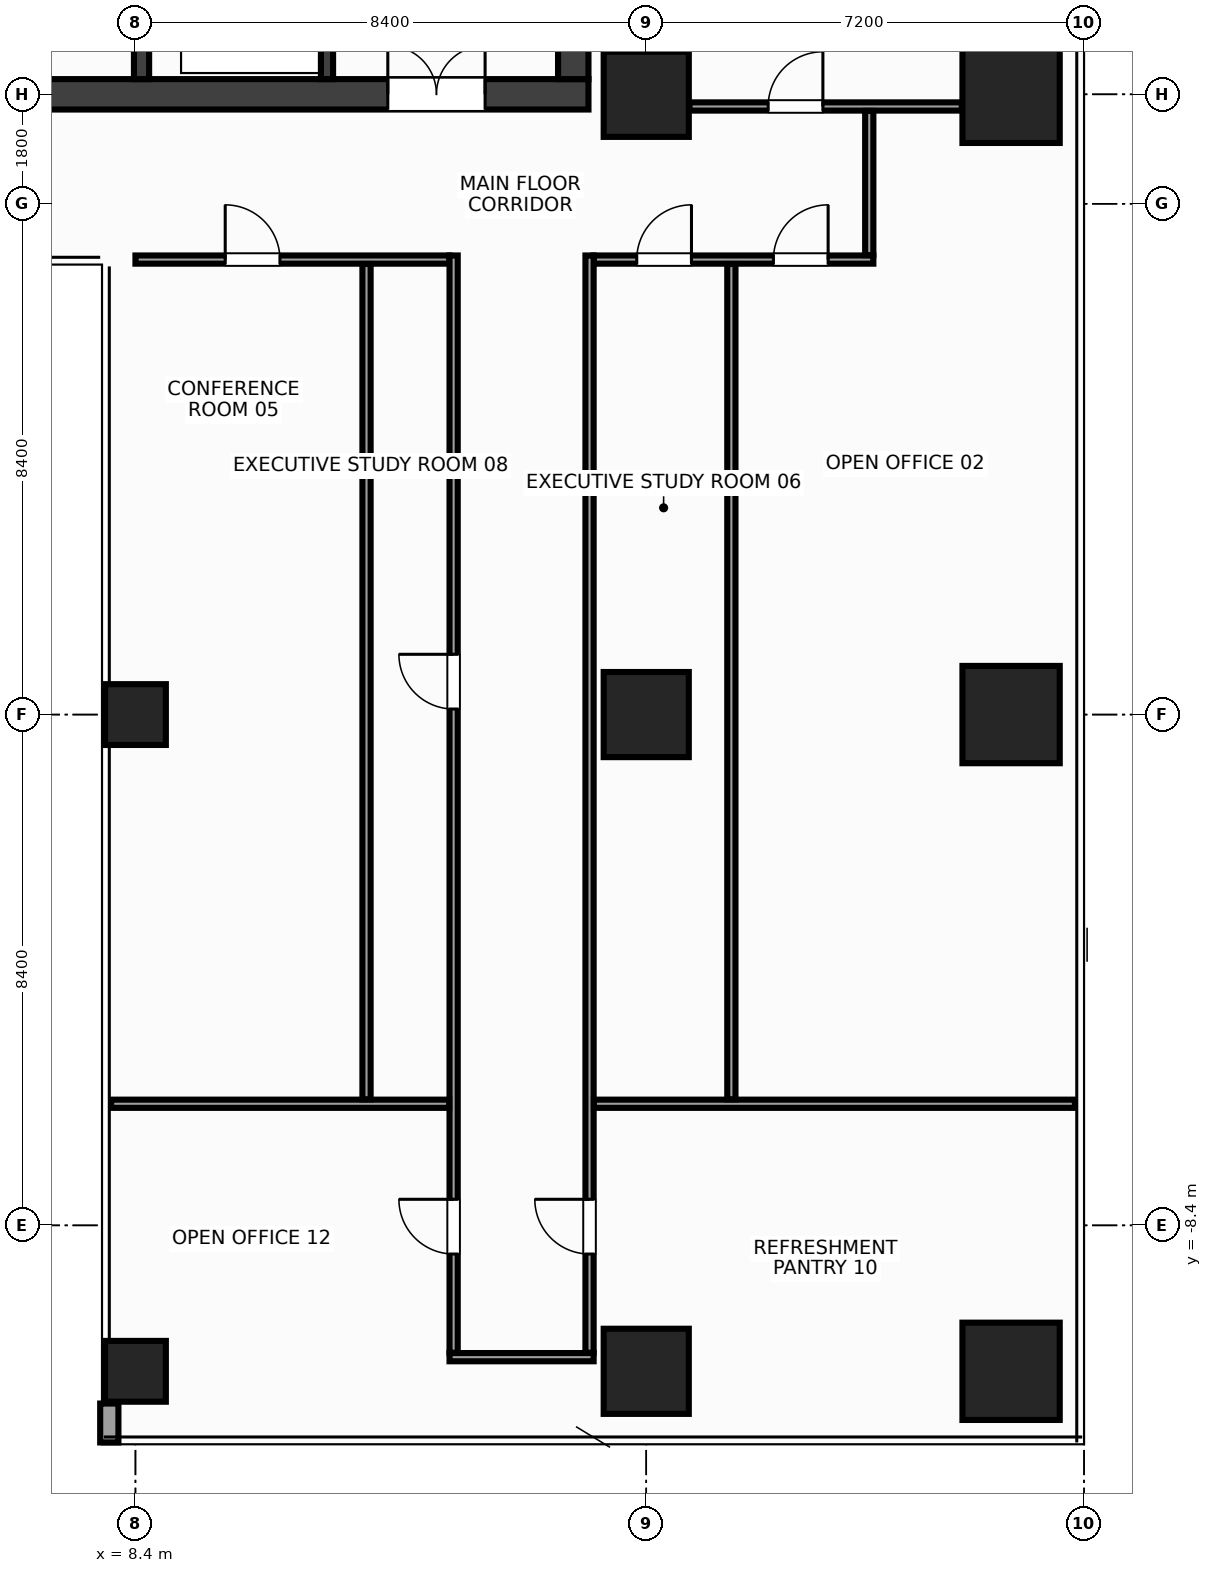
"""IFC4 building model, lengths in metres.
Left out: names, types, materials, properties, quantities, classifications, styles, units other than length and angle.
Written with IfcOpenShell. Run it as: python <this file> out.ifc"""

import sys

from ifc_helpers import new_model, si_unit, direction, frame, frame_2d, origin, origin_2d, place, context, subcontext, project, spatial, rectangle, hollow_rectangle, extrude, source, transform, mapped, element, fill, save


model = new_model("IFC4")
c1 = context("Model", 3, precision=1e-05, world=origin(), true_north=direction((0.0, 1.0)))
c2 = subcontext(c1, "Body", "Model", "MODEL_VIEW")
j1 = project(units=[si_unit("LENGTHUNIT", "METRE"), si_unit("PLANEANGLEUNIT", "RADIAN")], contexts=[c1])
p1 = place(None, origin())
s1 = spatial("IfcSite", under=j1, at=p1, CompositionType="ELEMENT")
p2 = place(p1, origin())
s2 = spatial("IfcBuilding", under=s1, at=p2, CompositionType="ELEMENT")
p3 = place(p2, frame((0.0, 0.0, 200.0)))
s3 = spatial("IfcBuildingStorey", under=s2, at=p3, CompositionType="ELEMENT", Elevation=200.0)
m1 = source(origin(), c2, "Body", "SweptSolid", [
    extrude(rectangle(XDim=31.7, YDim=0.5, at=frame_2d((15.85, 0.0))), origin(), (0.0, 0.0, 1.0), 3.6),
])
p4 = place(p3, frame((-15.85, 10.2, 0.0), z_axis=(0.0, 0.0, 1.0), x_axis=(1.0, 0.0, 0.0)))
e1 = element("IfcWall", 1, at=p4, inside=s3, PredefinedType="SHEAR", context=c2, shape_type="MappedRepresentation", body=[
    mapped(m1, transform((0.0, 0.0, 0.0), x_axis=(1.0, 0.0, 0.0), y_axis=(0.0, 1.0, 0.0), z_axis=(0.0, 0.0, 1.0), scale=1.0)),
])
p5 = place(p4, frame((1.7, 0.0, 0.0)))
e2 = element("IfcOpeningElement", 2, at=p5, cuts=e1, PredefinedType="OPENING", context=c2, shape_type="SweptSolid", body=[
    extrude(rectangle(XDim=1.6, YDim=2.15, at=frame_2d((0.8, 1.075))), frame((0.0, 0.262, 0.0), z_axis=(0.0, -1.0, 0.0), x_axis=(1.0, 0.0, 0.0)), (0.0, 0.0, 1.0), 0.524),
])
p6 = place(p4, frame((28.4, 0.0, 0.0)))
e3 = element("IfcOpeningElement", 3, at=p6, cuts=e1, PredefinedType="OPENING", context=c2, shape_type="SweptSolid", body=[
    extrude(rectangle(XDim=1.6, YDim=2.15, at=frame_2d((0.8, 1.075))), frame((0.0, 0.262, 0.0), z_axis=(0.0, -1.0, 0.0), x_axis=(1.0, 0.0, 0.0)), (0.0, 0.0, 1.0), 0.524),
])
p7 = place(p4, frame((15.1, 0.0, 0.0)))
e4 = element("IfcOpeningElement", 4, at=p7, cuts=e1, PredefinedType="OPENING", context=c2, shape_type="SweptSolid", body=[
    extrude(rectangle(XDim=1.5, YDim=2.2, at=frame_2d((0.75, 1.1))), frame((0.0, 0.262, 0.0), z_axis=(0.0, -1.0, 0.0), x_axis=(1.0, 0.0, 0.0)), (0.0, 0.0, 1.0), 0.524),
])
m2 = source(origin(), c2, "Body", "SweptSolid", [
    extrude(rectangle(XDim=13.1, YDim=0.5, at=frame_2d((6.55, 0.0))), origin(), (0.0, 0.0, 1.0), 3.6),
])
p8 = place(p3, frame((15.6, 10.45, 0.0), z_axis=(0.0, 0.0, 1.0), x_axis=(0.0, 1.0, 0.0)))
e5 = element("IfcWall", 5, at=p8, inside=s3, PredefinedType="SHEAR", context=c2, shape_type="MappedRepresentation", body=[
    mapped(m2, transform((0.0, 0.0, 0.0), x_axis=(1.0, 0.0, 0.0), y_axis=(0.0, 1.0, 0.0), z_axis=(0.0, 0.0, 1.0), scale=1.0)),
])
m3 = source(origin(), c2, "Body", "SweptSolid", [
    extrude(rectangle(XDim=13.1, YDim=0.25, at=frame_2d((6.55, 0.0))), origin(), (0.0, 0.0, 1.0), 3.6),
])
p9 = place(p3, frame((8.5, 10.45, 0.0), z_axis=(0.0, 0.0, 1.0), x_axis=(0.0, 1.0, 0.0)))
e6 = element("IfcWall", 6, at=p9, inside=s3, PredefinedType="SHEAR", context=c2, shape_type="MappedRepresentation", body=[
    mapped(m3, transform((0.0, 0.0, 0.0), x_axis=(1.0, 0.0, 0.0), y_axis=(0.0, 1.0, 0.0), z_axis=(0.0, 0.0, 1.0), scale=1.0)),
])
p10 = place(p9, frame((10.0, 0.0, 0.0)))
e7 = element("IfcOpeningElement", 7, at=p10, cuts=e6, PredefinedType="OPENING", context=c2, shape_type="SweptSolid", body=[
    extrude(rectangle(XDim=0.95, YDim=2.15, at=frame_2d((0.475, 1.075))), frame((0.0, 0.137, 0.0), z_axis=(0.0, -1.0, 0.0), x_axis=(1.0, 0.0, 0.0)), (0.0, 0.0, 1.0), 0.274),
])
m4 = source(origin(), c2, "Body", "SweptSolid", [
    extrude(rectangle(XDim=3.2, YDim=0.2, at=frame_2d((1.6, 0.0))), origin(), (0.0, 0.0, 1.0), 3.6),
])
p11 = place(p3, frame((11.55, 10.45, 0.0), z_axis=(0.0, 0.0, 1.0), x_axis=(0.0, 1.0, 0.0)))
e8 = element("IfcWall", 8, at=p11, inside=s3, PredefinedType="SHEAR", context=c2, shape_type="MappedRepresentation", body=[
    mapped(m4, transform((0.0, 0.0, 0.0), x_axis=(1.0, 0.0, 0.0), y_axis=(0.0, 1.0, 0.0), z_axis=(0.0, 0.0, 1.0), scale=1.0)),
])
p12 = place(p11, frame((0.9, 0.0, 0.0)))
e9 = element("IfcOpeningElement", 9, at=p12, cuts=e8, PredefinedType="OPENING", context=c2, shape_type="SweptSolid", body=[
    extrude(rectangle(XDim=1.1, YDim=2.15, at=frame_2d((0.55, 1.075))), frame((0.0, 0.112, 0.0), z_axis=(0.0, -1.0, 0.0), x_axis=(1.0, 0.0, 0.0)), (0.0, 0.0, 1.0), 0.224),
])
m5 = source(origin(), c2, "Body", "SweptSolid", [
    extrude(rectangle(XDim=1.4, YDim=1.4, at=origin_2d()), origin(), (0.0, 0.0, 1.0), 3.6),
])
for number, where, z_axis, x_axis in (
    (10, (16.8, -10.8, 0.0), (0.0, 0.0, 1.0), (1.0, 0.0, 0.0)),
    (11, (16.8, 0.0, 0.0), (0.0, 0.0, 1.0), (1.0, 0.0, 0.0)),
    (12, (16.8, 10.2, 0.0), (0.0, 0.0, 1.0), (1.0, 0.0, 0.0)),
):
    element("IfcColumn", number, at=place(p3, frame(where, z_axis=z_axis, x_axis=x_axis)), inside=s3, PredefinedType="COLUMN", context=c2, shape_type="MappedRepresentation", body=[
        mapped(m5, transform((0.0, 0.0, 0.0), x_axis=(1.0, 0.0, 0.0), y_axis=(0.0, 1.0, 0.0), z_axis=(0.0, 0.0, 1.0), scale=1.0)),
    ])
m6 = source(origin(), c2, "Body", "SweptSolid", [
    extrude(rectangle(XDim=1.6, YDim=1.6, at=origin_2d()), origin(), (0.0, 0.0, 1.0), 3.6),
])
for number, where, z_axis, x_axis in (
    (13, (22.8, -10.8, 0.0), (0.0, 0.0, 1.0), (1.0, 0.0, 0.0)),
    (14, (22.8, 0.0, 0.0), (0.0, 0.0, 1.0), (1.0, 0.0, 0.0)),
    (15, (22.8, 10.2, 0.0), (0.0, 0.0, 1.0), (1.0, 0.0, 0.0)),
):
    element("IfcColumn", number, at=place(p3, frame(where, z_axis=z_axis, x_axis=x_axis)), inside=s3, PredefinedType="COLUMN", context=c2, shape_type="MappedRepresentation", body=[
        mapped(m6, transform((0.0, 0.0, 0.0), x_axis=(1.0, 0.0, 0.0), y_axis=(0.0, 1.0, 0.0), z_axis=(0.0, 0.0, 1.0), scale=1.0)),
    ])
m7 = source(origin(), c2, "Body", "SweptSolid", [
    extrude(hollow_rectangle(XDim=1.0, YDim=1.0, WallThickness=0.045, at=origin_2d()), origin(), (0.0, 0.0, 1.0), 3.6),
])
for number, where, z_axis, x_axis in (
    (16, (8.4, 0.0, 0.0), (0.0, 0.0, 1.0), (1.0, 0.0, 0.0)),
    (17, (8.4, -10.8, 0.0), (0.0, 0.0, 1.0), (1.0, 0.0, 0.0)),
):
    element("IfcColumn", number, at=place(p3, frame(where, z_axis=z_axis, x_axis=x_axis)), inside=s3, PredefinedType="COLUMN", context=c2, shape_type="MappedRepresentation", body=[
        mapped(m7, transform((0.0, 0.0, 0.0), x_axis=(1.0, 0.0, 0.0), y_axis=(0.0, 1.0, 0.0), z_axis=(0.0, 0.0, 1.0), scale=1.0)),
    ])
m8 = source(origin(), c2, "Body", "SweptSolid", [
    extrude(rectangle(XDim=0.64, YDim=0.24, at=frame_2d((0.32, 0.0))), origin(), (0.0, 0.0, 1.0), 2.76),
])
p13 = place(p3, frame((7.97, -11.33, 0.0), z_axis=(0.0, 0.0, 1.0), x_axis=(0.0, -1.0, 0.0)))
e18 = element("IfcWall", 18, at=p13, inside=s3, PredefinedType="STANDARD", context=c2, shape_type="MappedRepresentation", body=[
    mapped(m8, transform((0.0, 0.0, 0.0), x_axis=(1.0, 0.0, 0.0), y_axis=(0.0, 1.0, 0.0), z_axis=(0.0, 0.0, 1.0), scale=1.0)),
])
m9 = source(origin(), c2, "Body", "SweptSolid", [
    extrude(rectangle(XDim=4.48, YDim=0.135, at=frame_2d((2.24, 0.0))), origin(), (0.0, 0.0, 1.0), 2.915),
])
p14 = place(p3, frame((17.51, 10.0, 0.0), z_axis=(0.0, 0.0, 1.0), x_axis=(1.0, 0.0, 0.0)))
e19 = element("IfcWall", 19, at=p14, inside=s3, PredefinedType="PARTITIONING", context=c2, shape_type="MappedRepresentation", body=[
    mapped(m9, transform((0.0, 0.0, 0.0), x_axis=(1.0, 0.0, 0.0), y_axis=(0.0, 1.0, 0.0), z_axis=(0.0, 0.0, 1.0), scale=1.0)),
])
p15 = place(p14, frame((1.295, 0.0, 0.0)))
e20 = element("IfcOpeningElement", 20, at=p15, cuts=e19, PredefinedType="OPENING", context=c2, shape_type="SweptSolid", body=[
    extrude(rectangle(XDim=0.9, YDim=2.15, at=frame_2d((0.45, 1.075))), frame((0.0, 0.08, 0.0), z_axis=(0.0, -1.0, 0.0), x_axis=(1.0, 0.0, 0.0)), (0.0, 0.0, 1.0), 0.159),
])
m10 = source(origin(), c2, "Body", "SweptSolid", [
    extrude(rectangle(XDim=5.165, YDim=0.135, at=frame_2d((2.583, 0.0))), origin(), (0.0, 0.0, 1.0), 3.38),
])
p16 = place(p3, frame((8.4, 7.482, 0.0), z_axis=(0.0, 0.0, 1.0), x_axis=(1.0, 0.0, 0.0)))
e21 = element("IfcWall", 21, at=p16, inside=s3, PredefinedType="PARTITIONING", context=c2, shape_type="MappedRepresentation", body=[
    mapped(m10, transform((0.0, 0.0, 0.0), x_axis=(1.0, 0.0, 0.0), y_axis=(0.0, 1.0, 0.0), z_axis=(0.0, 0.0, 1.0), scale=1.0)),
])
p17 = place(p16, frame((1.476, 0.0, 0.0)))
e22 = element("IfcOpeningElement", 22, at=p17, cuts=e21, PredefinedType="OPENING", context=c2, shape_type="SweptSolid", body=[
    extrude(rectangle(XDim=0.9, YDim=2.15, at=frame_2d((0.45, 1.075))), frame((0.0, 0.08, 0.0), z_axis=(0.0, -1.0, 0.0), x_axis=(1.0, 0.0, 0.0)), (0.0, 0.0, 1.0), 0.159),
])
m11 = source(origin(), c2, "Body", "SweptSolid", [
    extrude(rectangle(XDim=4.6, YDim=0.135, at=frame_2d((2.3, 0.0))), origin(), (0.0, 0.0, 1.0), 2.765),
])
p18 = place(p3, frame((15.935, 7.482, 0.0), z_axis=(0.0, 0.0, 1.0), x_axis=(1.0, 0.0, 0.0)))
e23 = element("IfcWall", 23, at=p18, inside=s3, PredefinedType="PARTITIONING", context=c2, shape_type="MappedRepresentation", body=[
    mapped(m11, transform((0.0, 0.0, 0.0), x_axis=(1.0, 0.0, 0.0), y_axis=(0.0, 1.0, 0.0), z_axis=(0.0, 0.0, 1.0), scale=1.0)),
])
p19 = place(p18, frame((2.956, 0.0, 0.0)))
e24 = element("IfcOpeningElement", 24, at=p19, cuts=e23, PredefinedType="OPENING", context=c2, shape_type="SweptSolid", body=[
    extrude(rectangle(XDim=0.9, YDim=2.15, at=frame_2d((0.45, 1.075))), frame((0.0, 0.08, 0.0), z_axis=(0.0, -1.0, 0.0), x_axis=(1.0, 0.0, 0.0)), (0.0, 0.0, 1.0), 0.159),
])
p20 = place(p18, frame((0.709, 0.0, 0.0)))
e25 = element("IfcOpeningElement", 25, at=p20, cuts=e23, PredefinedType="OPENING", context=c2, shape_type="SweptSolid", body=[
    extrude(rectangle(XDim=0.9, YDim=2.15, at=frame_2d((0.45, 1.075))), frame((0.0, 0.08, 0.0), z_axis=(0.0, -1.0, 0.0), x_axis=(1.0, 0.0, 0.0)), (0.0, 0.0, 1.0), 0.159),
])
m12 = source(origin(), c2, "Body", "SweptSolid", [
    extrude(rectangle(XDim=2.37, YDim=0.135, at=frame_2d((1.185, 0.0))), origin(), (0.0, 0.0, 1.0), 3.38),
])
p21 = place(p3, frame((13.565, -10.567, 0.0), z_axis=(0.0, 0.0, 1.0), x_axis=(1.0, 0.0, 0.0)))
e26 = element("IfcWall", 26, at=p21, inside=s3, PredefinedType="PARTITIONING", context=c2, shape_type="MappedRepresentation", body=[
    mapped(m12, transform((0.0, 0.0, 0.0), x_axis=(1.0, 0.0, 0.0), y_axis=(0.0, 1.0, 0.0), z_axis=(0.0, 0.0, 1.0), scale=1.0)),
])
m13 = source(origin(), c2, "Body", "SweptSolid", [
    extrude(rectangle(XDim=2.373, YDim=0.135, at=frame_2d((1.186, 0.0))), origin(), (0.0, 0.0, 1.0), 3.38),
])
p22 = place(p3, frame((20.468, 7.555, 0.0), z_axis=(0.0, 0.0, 1.0), x_axis=(0.0, 1.0, 0.0)))
e27 = element("IfcWall", 27, at=p22, inside=s3, PredefinedType="PARTITIONING", context=c2, shape_type="MappedRepresentation", body=[
    mapped(m13, transform((0.0, 0.0, 0.0), x_axis=(1.0, 0.0, 0.0), y_axis=(0.0, 1.0, 0.0), z_axis=(0.0, 0.0, 1.0), scale=1.0)),
])
m14 = source(origin(), c2, "Body", "SweptSolid", [
    extrude(rectangle(XDim=18.045, YDim=0.135, at=frame_2d((9.022, 0.0))), origin(), (0.0, 0.0, 1.0), 2.915),
])
p23 = place(p3, frame((13.633, -10.495, 0.0), z_axis=(0.0, 0.0, 1.0), x_axis=(0.0, 1.0, 0.0)))
e28 = element("IfcWall", 28, at=p23, inside=s3, PredefinedType="PARTITIONING", context=c2, shape_type="MappedRepresentation", body=[
    mapped(m14, transform((0.0, 0.0, 0.0), x_axis=(1.0, 0.0, 0.0), y_axis=(0.0, 1.0, 0.0), z_axis=(0.0, 0.0, 1.0), scale=1.0)),
])
p24 = place(p23, frame((10.586, 0.0, 0.0)))
e29 = element("IfcOpeningElement", 29, at=p24, cuts=e28, PredefinedType="OPENING", context=c2, shape_type="SweptSolid", body=[
    extrude(rectangle(XDim=0.9, YDim=2.15, at=frame_2d((0.45, 1.075))), frame((0.0, 0.08, 0.0), z_axis=(0.0, -1.0, 0.0), x_axis=(1.0, 0.0, 0.0)), (0.0, 0.0, 1.0), 0.159),
])
p25 = place(p23, frame((1.624, 0.0, 0.0)))
e30 = element("IfcOpeningElement", 30, at=p25, cuts=e28, PredefinedType="OPENING", context=c2, shape_type="SweptSolid", body=[
    extrude(rectangle(XDim=0.9, YDim=2.15, at=frame_2d((0.45, 1.075))), frame((0.0, 0.08, 0.0), z_axis=(0.0, -1.0, 0.0), x_axis=(1.0, 0.0, 0.0)), (0.0, 0.0, 1.0), 0.159),
])
p26 = place(p3, frame((15.867, -10.495, 0.0), z_axis=(0.0, 0.0, 1.0), x_axis=(0.0, 1.0, 0.0)))
e31 = element("IfcWall", 31, at=p26, inside=s3, PredefinedType="PARTITIONING", context=c2, shape_type="MappedRepresentation", body=[
    mapped(m14, transform((0.0, 0.0, 0.0), x_axis=(1.0, 0.0, 0.0), y_axis=(0.0, 1.0, 0.0), z_axis=(0.0, 0.0, 1.0), scale=1.0)),
])
p27 = place(p26, frame((1.624, 0.0, 0.0)))
e32 = element("IfcOpeningElement", 32, at=p27, cuts=e31, PredefinedType="OPENING", context=c2, shape_type="SweptSolid", body=[
    extrude(rectangle(XDim=0.9, YDim=2.15, at=frame_2d((0.45, 1.075))), frame((0.0, 0.08, 0.0), z_axis=(0.0, -1.0, 0.0), x_axis=(1.0, 0.0, 0.0)), (0.0, 0.0, 1.0), 0.159),
])
m15 = source(origin(), c2, "Body", "SweptSolid", [
    extrude(rectangle(XDim=5.56, YDim=0.135, at=frame_2d((2.78, 0.0))), origin(), (0.0, 0.0, 1.0), 2.765),
])
p28 = place(p3, frame((8.0, -6.4, 0.0), z_axis=(0.0, 0.0, 1.0), x_axis=(1.0, 0.0, 0.0)))
e33 = element("IfcWall", 33, at=p28, inside=s3, PredefinedType="PARTITIONING", context=c2, shape_type="MappedRepresentation", body=[
    mapped(m15, transform((0.0, 0.0, 0.0), x_axis=(1.0, 0.0, 0.0), y_axis=(0.0, 1.0, 0.0), z_axis=(0.0, 0.0, 1.0), scale=1.0)),
])
m16 = source(origin(), c2, "Body", "SweptSolid", [
    extrude(rectangle(XDim=7.91, YDim=0.135, at=frame_2d((3.955, 0.0))), origin(), (0.0, 0.0, 1.0), 2.765),
])
p29 = place(p3, frame((15.94, -6.4, 0.0), z_axis=(0.0, 0.0, 1.0), x_axis=(1.0, 0.0, 0.0)))
e34 = element("IfcWall", 34, at=p29, inside=s3, PredefinedType="PARTITIONING", context=c2, shape_type="MappedRepresentation", body=[
    mapped(m16, transform((0.0, 0.0, 0.0), x_axis=(1.0, 0.0, 0.0), y_axis=(0.0, 1.0, 0.0), z_axis=(0.0, 0.0, 1.0), scale=1.0)),
])
m17 = source(origin(), c2, "Body", "SweptSolid", [
    extrude(rectangle(XDim=13.737, YDim=0.135, at=frame_2d((6.869, 0.0))), origin(), (0.0, 0.0, 1.0), 2.915),
])
for number, where, z_axis, x_axis in (
    (35, (12.2, -6.327, 0.0), (0.0, 0.0, 1.0), (0.0, 1.0, 0.0)),
    (36, (18.2, -6.327, 0.0), (0.0, 0.0, 1.0), (0.0, 1.0, 0.0)),
):
    element("IfcWall", number, at=place(p3, frame(where, z_axis=z_axis, x_axis=x_axis)), inside=s3, PredefinedType="PARTITIONING", context=c2, shape_type="MappedRepresentation", body=[
        mapped(m17, transform((0.0, 0.0, 0.0), x_axis=(1.0, 0.0, 0.0), y_axis=(0.0, 1.0, 0.0), z_axis=(0.0, 0.0, 1.0), scale=1.0)),
    ])
m18 = source(origin(), c2, "Body", "SweptSolid", [
    extrude(rectangle(XDim=1.6, YDim=2.15, at=frame_2d((0.8, 1.075))), frame((0.0, 0.025, 0.0), z_axis=(0.0, -1.0, 0.0), x_axis=(1.0, 0.0, 0.0)), (0.0, 0.0, 1.0), 0.05),
])
p30 = place(p6, origin())
e37 = element("IfcDoor", 37, at=p30, inside=s3, OperationType="DOUBLE_DOOR_SINGLE_SWING", PredefinedType="DOOR", context=c2, shape_type="MappedRepresentation", body=[
    mapped(m18, transform((0.0, 0.0, 0.0), x_axis=(1.0, 0.0, 0.0), y_axis=(0.0, 1.0, 0.0), z_axis=(0.0, 0.0, 1.0), scale=1.0)),
])
fill(e3, e37)
m19 = source(origin(), c2, "Body", "SweptSolid", [
    extrude(rectangle(XDim=0.9, YDim=2.15, at=frame_2d((0.45, 1.075))), frame((0.0, 0.025, 0.0), z_axis=(0.0, -1.0, 0.0), x_axis=(1.0, 0.0, 0.0)), (0.0, 0.0, 1.0), 0.05),
])
p31 = place(p15, origin())
e38 = element("IfcDoor", 38, at=p31, inside=s3, OperationType="SINGLE_SWING_RIGHT", PredefinedType="DOOR", context=c2, shape_type="MappedRepresentation", body=[
    mapped(m19, transform((0.0, 0.0, 0.0), x_axis=(1.0, 0.0, 0.0), y_axis=(0.0, 1.0, 0.0), z_axis=(0.0, 0.0, 1.0), scale=1.0)),
])
fill(e20, e38)
p32 = place(p19, origin())
e39 = element("IfcDoor", 39, at=p32, inside=s3, OperationType="SINGLE_SWING_RIGHT", PredefinedType="DOOR", context=c2, shape_type="MappedRepresentation", body=[
    mapped(m19, transform((0.0, 0.0, 0.0), x_axis=(1.0, 0.0, 0.0), y_axis=(0.0, 1.0, 0.0), z_axis=(0.0, 0.0, 1.0), scale=1.0)),
])
fill(e24, e39)
p33 = place(p17, origin())
e40 = element("IfcDoor", 40, at=p33, inside=s3, OperationType="SINGLE_SWING_LEFT", PredefinedType="DOOR", context=c2, shape_type="MappedRepresentation", body=[
    mapped(m19, transform((0.0, 0.0, 0.0), x_axis=(1.0, 0.0, 0.0), y_axis=(0.0, 1.0, 0.0), z_axis=(0.0, 0.0, 1.0), scale=1.0)),
])
fill(e22, e40)
p34 = place(p20, origin())
e41 = element("IfcDoor", 41, at=p34, inside=s3, OperationType="SINGLE_SWING_RIGHT", PredefinedType="DOOR", context=c2, shape_type="MappedRepresentation", body=[
    mapped(m19, transform((0.0, 0.0, 0.0), x_axis=(1.0, 0.0, 0.0), y_axis=(0.0, 1.0, 0.0), z_axis=(0.0, 0.0, 1.0), scale=1.0)),
])
fill(e25, e41)
p35 = place(p24, origin())
e42 = element("IfcDoor", 42, at=p35, inside=s3, OperationType="SINGLE_SWING_RIGHT", PredefinedType="DOOR", context=c2, shape_type="MappedRepresentation", body=[
    mapped(m19, transform((0.0, 0.0, 0.0), x_axis=(1.0, 0.0, 0.0), y_axis=(0.0, 1.0, 0.0), z_axis=(0.0, 0.0, 1.0), scale=1.0)),
])
fill(e29, e42)
p36 = place(p27, origin())
e43 = element("IfcDoor", 43, at=p36, inside=s3, OperationType="SINGLE_SWING_RIGHT", PredefinedType="DOOR", context=c2, shape_type="MappedRepresentation", body=[
    mapped(m19, transform((0.0, 0.0, 0.0), x_axis=(1.0, 0.0, 0.0), y_axis=(0.0, 1.0, 0.0), z_axis=(0.0, 0.0, 1.0), scale=1.0)),
])
fill(e32, e43)
p37 = place(p25, origin())
e44 = element("IfcDoor", 44, at=p37, inside=s3, OperationType="SINGLE_SWING_RIGHT", PredefinedType="DOOR", context=c2, shape_type="MappedRepresentation", body=[
    mapped(m19, transform((0.0, 0.0, 0.0), x_axis=(1.0, 0.0, 0.0), y_axis=(0.0, 1.0, 0.0), z_axis=(0.0, 0.0, 1.0), scale=1.0)),
])
fill(e30, e44)
save(model, sys.argv[1])
